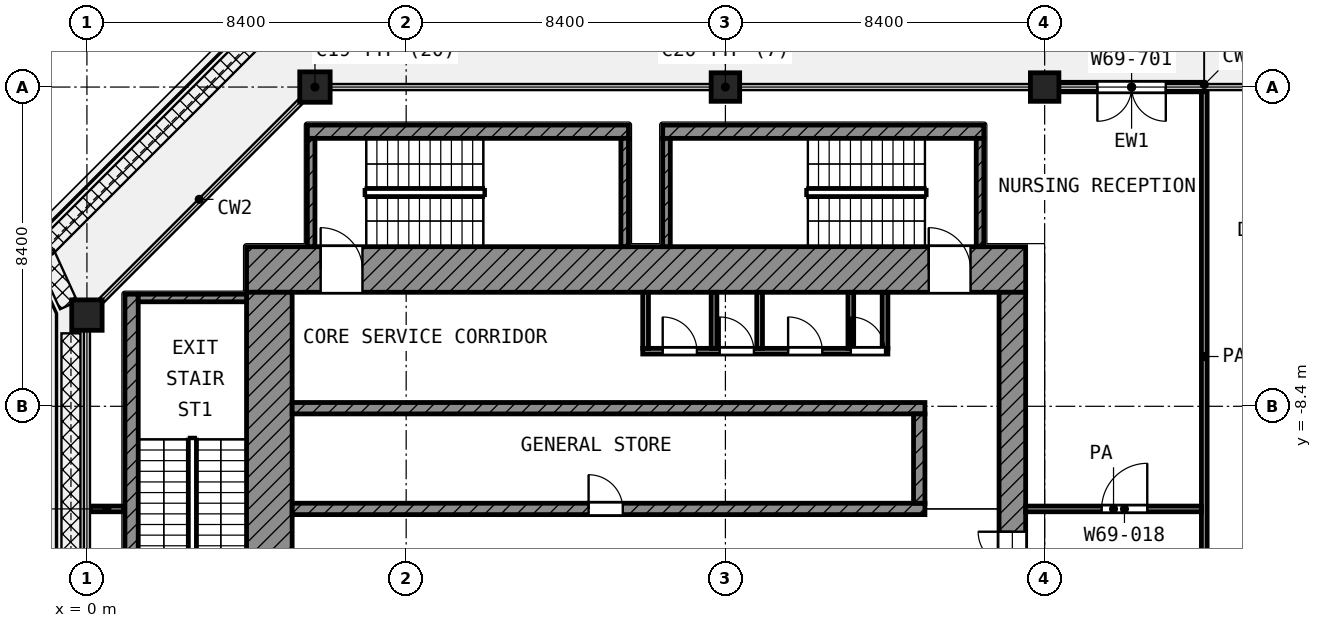
"""IFC4 building model, lengths in metres.
Left out: names, types, materials, properties, quantities, classifications, styles, units other than length and angle.
Written with IfcOpenShell. Run it as: python <this file> out.ifc"""

import sys

from ifc_helpers import new_model, si_unit, direction, frame, frame_2d, origin, origin_2d, place, context, subcontext, project, spatial, rectangle, extrude, element, fill, save


model = new_model("IFC4")
c1 = context("Model", 3, precision=1e-05, world=origin(), true_north=direction((0.0, 1.0)))
c2 = subcontext(c1, "Body", "Model", "MODEL_VIEW")
j1 = project(units=[si_unit("LENGTHUNIT", "METRE"), si_unit("PLANEANGLEUNIT", "RADIAN")], contexts=[c1])
p1 = place(None, origin())
s1 = spatial("IfcSite", under=j1, at=p1, CompositionType="ELEMENT")
p2 = place(p1, origin())
s2 = spatial("IfcBuilding", under=s1, at=p2, CompositionType="ELEMENT")
p3 = place(p2, frame((0.0, 0.0, 298.6)))
s3 = spatial("IfcBuildingStorey", under=s2, at=p3, CompositionType="ELEMENT", Elevation=298.6)
p4 = place(p3, frame((6.0, 0.0, 0.0), z_axis=(0.0, 0.0, 1.0), x_axis=(1.0, 0.0, 0.0)))
e1 = element("IfcColumn", 1, at=p4, inside=s3, PredefinedType="COLUMN", context=c2, shape_type="SweptSolid", body=[
    extrude(rectangle(XDim=0.8, YDim=0.8, at=origin_2d()), origin(), (0.0, 0.0, 1.0), 4.2),
])
for number, where, z_axis, x_axis in (
    (2, (16.8, 0.0, 0.0), (0.0, 0.0, 1.0), (1.0, 0.0, 0.0)),
    (3, (25.2, 0.0, 0.0), (0.0, 0.0, 1.0), (1.0, 0.0, 0.0)),
):
    element("IfcColumn", number, at=place(p3, frame(where, z_axis=z_axis, x_axis=x_axis)), inside=s3, PredefinedType="COLUMN", context=c2, shape_type="SweptSolid", body=[
        extrude(rectangle(XDim=0.75, YDim=0.75, at=origin_2d()), origin(), (0.0, 0.0, 1.0), 4.2),
    ])
p5 = place(p3, frame((0.0, -6.0, 0.0), z_axis=(0.0, 0.0, 1.0), x_axis=(1.0, 0.0, 0.0)))
e4 = element("IfcColumn", 4, at=p5, inside=s3, PredefinedType="COLUMN", context=c2, shape_type="SweptSolid", body=[
    extrude(rectangle(XDim=0.8, YDim=0.8, at=origin_2d()), origin(), (0.0, 0.0, 1.0), 4.2),
])
p6 = place(p3, frame((29.4, 0.0, 0.0), z_axis=(0.0, 0.0, 1.0), x_axis=(-1.0, 0.0, 0.0)))
e5 = element("IfcWall", 5, at=p6, inside=s3, PredefinedType="SOLIDWALL", context=c2, shape_type="SweptSolid", body=[
    extrude(rectangle(XDim=3.825, YDim=0.25, at=frame_2d((1.913, 0.0))), origin(), (0.0, 0.0, 1.0), 3.48),
])
p7 = place(p6, frame((1.012, 0.0, 0.0)))
e6 = element("IfcOpeningElement", 6, at=p7, cuts=e5, PredefinedType="OPENING", context=c2, shape_type="SweptSolid", body=[
    extrude(rectangle(XDim=1.8, YDim=2.1, at=frame_2d((0.9, 1.05))), frame((0.0, 0.135, 0.0), z_axis=(0.0, -1.0, 0.0), x_axis=(1.0, 0.0, 0.0)), (0.0, 0.0, 1.0), 0.27),
])
p8 = place(p3, frame((4.2, -4.8, 0.0), z_axis=(0.0, 0.0, 1.0), x_axis=(1.0, 0.0, 0.0)))
e7 = element("IfcWall", 7, at=p8, inside=s3, PredefinedType="SHEAR", context=c2, shape_type="SweptSolid", body=[
    extrude(rectangle(XDim=20.5, YDim=1.2, at=frame_2d((10.25, 0.0))), origin(), (0.0, 0.0, 1.0), 3.6),
])
p9 = place(p8, frame((1.95, 0.0, 0.0)))
e8 = element("IfcOpeningElement", 8, at=p9, cuts=e7, PredefinedType="OPENING", context=c2, shape_type="SweptSolid", body=[
    extrude(rectangle(XDim=1.1, YDim=2.1, at=frame_2d((0.55, 1.05))), frame((0.0, 0.61, 0.0), z_axis=(0.0, -1.0, 0.0), x_axis=(1.0, 0.0, 0.0)), (0.0, 0.0, 1.0), 1.22),
])
p10 = place(p8, frame((17.95, 0.0, 0.0)))
e9 = element("IfcOpeningElement", 9, at=p10, cuts=e7, PredefinedType="OPENING", context=c2, shape_type="SweptSolid", body=[
    extrude(rectangle(XDim=1.1, YDim=2.1, at=frame_2d((0.55, 1.05))), frame((0.0, 0.61, 0.0), z_axis=(0.0, -1.0, 0.0), x_axis=(1.0, 0.0, 0.0)), (0.0, 0.0, 1.0), 1.22),
])
p11 = place(p3, frame((4.8, -24.7, 0.0), z_axis=(0.0, 0.0, 1.0), x_axis=(0.0, 1.0, 0.0)))
e10 = element("IfcWall", 10, at=p11, inside=s3, PredefinedType="SHEAR", context=c2, shape_type="SweptSolid", body=[
    extrude(rectangle(XDim=19.3, YDim=1.2, at=frame_2d((9.65, 0.0))), origin(), (0.0, 0.0, 1.0), 3.6),
])
p12 = place(p11, frame((11.15, 0.0, 0.0)))
e11 = element("IfcOpeningElement", 11, at=p12, cuts=e10, PredefinedType="OPENING", context=c2, shape_type="SweptSolid", body=[
    extrude(rectangle(XDim=1.1, YDim=2.1, at=frame_2d((0.55, 1.05))), frame((0.0, 0.61, 0.0), z_axis=(0.0, -1.0, 0.0), x_axis=(1.0, 0.0, 0.0)), (0.0, 0.0, 1.0), 1.22),
])
p13 = place(p11, frame((1.85, 0.0, 0.0)))
e12 = element("IfcOpeningElement", 12, at=p13, cuts=e10, PredefinedType="OPENING", context=c2, shape_type="SweptSolid", body=[
    extrude(rectangle(XDim=1.1, YDim=2.1, at=frame_2d((0.55, 1.05))), frame((0.0, 0.61, 0.0), z_axis=(0.0, -1.0, 0.0), x_axis=(1.0, 0.0, 0.0)), (0.0, 0.0, 1.0), 1.22),
])
p14 = place(p3, frame((24.35, -24.0, 0.0), z_axis=(0.0, 0.0, 1.0), x_axis=(0.0, 1.0, 0.0)))
e13 = element("IfcWall", 13, at=p14, inside=s3, PredefinedType="SHEAR", context=c2, shape_type="SweptSolid", body=[
    extrude(rectangle(XDim=18.6, YDim=0.7, at=frame_2d((9.3, 0.0))), origin(), (0.0, 0.0, 1.0), 3.6),
])
p15 = place(p14, frame((10.5, 0.0, 0.0)))
e14 = element("IfcOpeningElement", 14, at=p15, cuts=e13, PredefinedType="OPENING", context=c2, shape_type="SweptSolid", body=[
    extrude(rectangle(XDim=1.8, YDim=2.1, at=frame_2d((0.9, 1.05))), frame((0.0, 0.36, 0.0), z_axis=(0.0, -1.0, 0.0), x_axis=(1.0, 0.0, 0.0)), (0.0, 0.0, 1.0), 0.72),
])
p16 = place(p3, frame((5.4, -8.45, 0.0), z_axis=(0.0, 0.0, 1.0), x_axis=(1.0, 0.0, 0.0)))
e15 = element("IfcWall", 15, at=p16, inside=s3, PredefinedType="SHEAR", context=c2, shape_type="SweptSolid", body=[
    extrude(rectangle(XDim=16.65, YDim=0.3, at=frame_2d((8.325, 0.0))), origin(), (0.0, 0.0, 1.0), 3.6),
])
p17 = place(p3, frame((5.4, -11.1, 0.0), z_axis=(0.0, 0.0, 1.0), x_axis=(1.0, 0.0, 0.0)))
e16 = element("IfcWall", 16, at=p17, inside=s3, PredefinedType="SHEAR", context=c2, shape_type="SweptSolid", body=[
    extrude(rectangle(XDim=16.65, YDim=0.3, at=frame_2d((8.325, 0.0))), origin(), (0.0, 0.0, 1.0), 3.6),
])
p18 = place(p17, frame((7.8, 0.0, 0.0)))
e17 = element("IfcOpeningElement", 17, at=p18, cuts=e16, PredefinedType="OPENING", context=c2, shape_type="SweptSolid", body=[
    extrude(rectangle(XDim=0.9, YDim=2.1, at=frame_2d((0.45, 1.05))), frame((0.0, 0.16, 0.0), z_axis=(0.0, -1.0, 0.0), x_axis=(1.0, 0.0, 0.0)), (0.0, 0.0, 1.0), 0.32),
])
p19 = place(p3, frame((21.9, -10.95, 0.0), z_axis=(0.0, 0.0, 1.0), x_axis=(0.0, 1.0, 0.0)))
e18 = element("IfcWall", 18, at=p19, inside=s3, PredefinedType="SHEAR", context=c2, shape_type="SweptSolid", body=[
    extrude(rectangle(XDim=2.35, YDim=0.3, at=frame_2d((1.175, 0.0))), origin(), (0.0, 0.0, 1.0), 3.6),
])
p20 = place(p3, frame((14.625, -6.95, 0.0), z_axis=(0.0, 0.0, 1.0), x_axis=(1.0, 0.0, 0.0)))
e19 = element("IfcWall", 19, at=p20, inside=s3, PredefinedType="PARTITIONING", context=c2, shape_type="SweptSolid", body=[
    extrude(rectangle(XDim=6.45, YDim=0.15, at=frame_2d((3.225, 0.0))), origin(), (0.0, 0.0, 1.0), 3.6),
])
p21 = place(p20, frame((0.525, 0.0, 0.0)))
e20 = element("IfcOpeningElement", 20, at=p21, cuts=e19, PredefinedType="OPENING", context=c2, shape_type="SweptSolid", body=[
    extrude(rectangle(XDim=0.9, YDim=2.1, at=frame_2d((0.45, 1.05))), frame((0.0, 0.085, 0.0), z_axis=(0.0, -1.0, 0.0), x_axis=(1.0, 0.0, 0.0)), (0.0, 0.0, 1.0), 0.17),
])
p22 = place(p20, frame((2.025, 0.0, 0.0)))
e21 = element("IfcOpeningElement", 21, at=p22, cuts=e19, PredefinedType="OPENING", context=c2, shape_type="SweptSolid", body=[
    extrude(rectangle(XDim=0.9, YDim=2.1, at=frame_2d((0.45, 1.05))), frame((0.0, 0.085, 0.0), z_axis=(0.0, -1.0, 0.0), x_axis=(1.0, 0.0, 0.0)), (0.0, 0.0, 1.0), 0.17),
])
p23 = place(p20, frame((3.825, 0.0, 0.0)))
e22 = element("IfcOpeningElement", 22, at=p23, cuts=e19, PredefinedType="OPENING", context=c2, shape_type="SweptSolid", body=[
    extrude(rectangle(XDim=0.9, YDim=2.1, at=frame_2d((0.45, 1.05))), frame((0.0, 0.085, 0.0), z_axis=(0.0, -1.0, 0.0), x_axis=(1.0, 0.0, 0.0)), (0.0, 0.0, 1.0), 0.17),
])
p24 = place(p20, frame((5.475, 0.0, 0.0)))
e23 = element("IfcOpeningElement", 23, at=p24, cuts=e19, PredefinedType="OPENING", context=c2, shape_type="SweptSolid", body=[
    extrude(rectangle(XDim=0.9, YDim=2.1, at=frame_2d((0.45, 1.05))), frame((0.0, 0.085, 0.0), z_axis=(0.0, -1.0, 0.0), x_axis=(1.0, 0.0, 0.0)), (0.0, 0.0, 1.0), 0.17),
])
for number, where, z_axis, x_axis in (
    (24, (14.7, -6.875, 0.0), (0.0, 0.0, 1.0), (0.0, 1.0, 0.0)),
    (25, (16.5, -6.875, 0.0), (0.0, 0.0, 1.0), (0.0, 1.0, 0.0)),
    (26, (17.7, -6.875, 0.0), (0.0, 0.0, 1.0), (0.0, 1.0, 0.0)),
    (27, (20.1, -6.875, 0.0), (0.0, 0.0, 1.0), (0.0, 1.0, 0.0)),
    (28, (21.0, -6.875, 0.0), (0.0, 0.0, 1.0), (0.0, 1.0, 0.0)),
):
    element("IfcWall", number, at=place(p3, frame(where, z_axis=z_axis, x_axis=x_axis)), inside=s3, PredefinedType="PARTITIONING", context=c2, shape_type="SweptSolid", body=[
        extrude(rectangle(XDim=1.475, YDim=0.15, at=frame_2d((0.738, 0.0))), origin(), (0.0, 0.0, 1.0), 3.6),
    ])
p25 = place(p3, frame((1.175, -13.9, 0.0), z_axis=(0.0, 0.0, 1.0), x_axis=(0.0, 1.0, 0.0)))
e29 = element("IfcWall", 29, at=p25, inside=s3, PredefinedType="SHEAR", context=c2, shape_type="SweptSolid", body=[
    extrude(rectangle(XDim=8.45, YDim=0.35, at=frame_2d((4.225, 0.0))), origin(), (0.0, 0.0, 1.0), 3.6),
])
p26 = place(p3, frame((1.35, -5.55, 0.0), z_axis=(0.0, 0.0, 1.0), x_axis=(1.0, 0.0, 0.0)))
e30 = element("IfcWall", 30, at=p26, inside=s3, PredefinedType="SHEAR", context=c2, shape_type="SweptSolid", body=[
    extrude(rectangle(XDim=2.85, YDim=0.2, at=frame_2d((1.425, 0.0))), origin(), (0.0, 0.0, 1.0), 3.6),
])
p27 = place(p3, frame((5.8, -1.175, 0.0), z_axis=(0.0, 0.0, 1.0), x_axis=(1.0, 0.0, 0.0)))
e31 = element("IfcWall", 31, at=p27, inside=s3, PredefinedType="SHEAR", context=c2, shape_type="SweptSolid", body=[
    extrude(rectangle(XDim=8.45, YDim=0.35, at=frame_2d((4.225, 0.0))), origin(), (0.0, 0.0, 1.0), 3.6),
])
for number, where, z_axis, x_axis in (
    (32, (5.9, -4.2, 0.0), (0.0, 0.0, 1.0), (0.0, 1.0, 0.0)),
    (33, (14.15, -4.2, 0.0), (0.0, 0.0, 1.0), (0.0, 1.0, 0.0)),
):
    element("IfcWall", number, at=place(p3, frame(where, z_axis=z_axis, x_axis=x_axis)), inside=s3, PredefinedType="SHEAR", context=c2, shape_type="SweptSolid", body=[
        extrude(rectangle(XDim=2.85, YDim=0.2, at=frame_2d((1.425, 0.0))), origin(), (0.0, 0.0, 1.0), 3.6),
    ])
p28 = place(p3, frame((15.15, -1.175, 0.0), z_axis=(0.0, 0.0, 1.0), x_axis=(1.0, 0.0, 0.0)))
e34 = element("IfcWall", 34, at=p28, inside=s3, PredefinedType="SHEAR", context=c2, shape_type="SweptSolid", body=[
    extrude(rectangle(XDim=8.45, YDim=0.35, at=frame_2d((4.225, 0.0))), origin(), (0.0, 0.0, 1.0), 3.6),
])
for number, where, z_axis, x_axis in (
    (35, (15.25, -4.2, 0.0), (0.0, 0.0, 1.0), (0.0, 1.0, 0.0)),
    (36, (23.5, -4.2, 0.0), (0.0, 0.0, 1.0), (0.0, 1.0, 0.0)),
):
    element("IfcWall", number, at=place(p3, frame(where, z_axis=z_axis, x_axis=x_axis)), inside=s3, PredefinedType="SHEAR", context=c2, shape_type="SweptSolid", body=[
        extrude(rectangle(XDim=2.85, YDim=0.2, at=frame_2d((1.425, 0.0))), origin(), (0.0, 0.0, 1.0), 3.6),
    ])
p29 = place(p3, frame((0.08, -11.1, 0.0), z_axis=(0.0, 0.0, 1.0), x_axis=(1.0, 0.0, 0.0)))
e37 = element("IfcWall", 37, at=p29, inside=s3, PredefinedType="PARTITIONING", context=c2, shape_type="SweptSolid", body=[
    extrude(rectangle(XDim=0.89, YDim=0.15, at=frame_2d((0.445, 0.0))), origin(), (0.0, 0.0, 1.0), 2.7),
])
p30 = place(p3, frame((24.7, -11.1, 0.0), z_axis=(0.0, 0.0, 1.0), x_axis=(1.0, 0.0, 0.0)))
e38 = element("IfcWall", 38, at=p30, inside=s3, PredefinedType="PARTITIONING", context=c2, shape_type="SweptSolid", body=[
    extrude(rectangle(XDim=4.625, YDim=0.15, at=frame_2d((2.312, 0.0))), origin(), (0.0, 0.0, 1.0), 3.6),
])
p31 = place(p30, frame((2.0, 0.0, 0.0)))
e39 = element("IfcOpeningElement", 39, at=p31, cuts=e38, PredefinedType="OPENING", context=c2, shape_type="SweptSolid", body=[
    extrude(rectangle(XDim=1.2, YDim=2.1, at=frame_2d((0.6, 1.05))), frame((0.0, 0.085, 0.0), z_axis=(0.0, -1.0, 0.0), x_axis=(1.0, 0.0, 0.0)), (0.0, 0.0, 1.0), 0.17),
])
p32 = place(p3, frame((29.4, -14.1, 0.0), z_axis=(0.0, 0.0, 1.0), x_axis=(0.0, 1.0, 0.0)))
e40 = element("IfcWall", 40, at=p32, inside=s3, PredefinedType="PARTITIONING", context=c2, shape_type="SweptSolid", body=[
    extrude(rectangle(XDim=14.02, YDim=0.15, at=frame_2d((7.01, 0.0))), origin(), (0.0, 0.0, 1.0), 3.6),
])
p33 = place(p7, origin())
e41 = element("IfcDoor", 41, at=p33, inside=s3, OperationType="DOUBLE_DOOR_SINGLE_SWING", PredefinedType="DOOR", context=c2, shape_type="SweptSolid", body=[
    extrude(rectangle(XDim=1.8, YDim=2.1, at=frame_2d((0.9, 1.05))), frame((0.0, 0.025, 0.0), z_axis=(0.0, -1.0, 0.0), x_axis=(1.0, 0.0, 0.0)), (0.0, 0.0, 1.0), 0.05),
])
fill(e6, e41)
p34 = place(p9, origin())
e42 = element("IfcDoor", 42, at=p34, inside=s3, OperationType="SINGLE_SWING_LEFT", PredefinedType="DOOR", context=c2, shape_type="SweptSolid", body=[
    extrude(rectangle(XDim=1.1, YDim=2.1, at=frame_2d((0.55, 1.05))), frame((0.0, 0.025, 0.0), z_axis=(0.0, -1.0, 0.0), x_axis=(1.0, 0.0, 0.0)), (0.0, 0.0, 1.0), 0.05),
])
fill(e8, e42)
p35 = place(p10, origin())
e43 = element("IfcDoor", 43, at=p35, inside=s3, OperationType="SINGLE_SWING_LEFT", PredefinedType="DOOR", context=c2, shape_type="SweptSolid", body=[
    extrude(rectangle(XDim=1.1, YDim=2.1, at=frame_2d((0.55, 1.05))), frame((0.0, 0.025, 0.0), z_axis=(0.0, -1.0, 0.0), x_axis=(1.0, 0.0, 0.0)), (0.0, 0.0, 1.0), 0.05),
])
fill(e9, e43)
p36 = place(p15, origin())
e44 = element("IfcDoor", 44, at=p36, inside=s3, OperationType="DOUBLE_DOOR_SINGLE_SWING", PredefinedType="DOOR", context=c2, shape_type="SweptSolid", body=[
    extrude(rectangle(XDim=1.8, YDim=2.1, at=frame_2d((0.9, 1.05))), frame((0.0, 0.025, 0.0), z_axis=(0.0, -1.0, 0.0), x_axis=(1.0, 0.0, 0.0)), (0.0, 0.0, 1.0), 0.05),
])
fill(e14, e44)
p37 = place(p21, origin())
e45 = element("IfcDoor", 45, at=p37, inside=s3, OperationType="SINGLE_SWING_LEFT", PredefinedType="DOOR", context=c2, shape_type="SweptSolid", body=[
    extrude(rectangle(XDim=0.9, YDim=2.1, at=frame_2d((0.45, 1.05))), frame((0.0, 0.025, 0.0), z_axis=(0.0, -1.0, 0.0), x_axis=(1.0, 0.0, 0.0)), (0.0, 0.0, 1.0), 0.05),
])
fill(e20, e45)
p38 = place(p22, origin())
e46 = element("IfcDoor", 46, at=p38, inside=s3, OperationType="SINGLE_SWING_LEFT", PredefinedType="DOOR", context=c2, shape_type="SweptSolid", body=[
    extrude(rectangle(XDim=0.9, YDim=2.1, at=frame_2d((0.45, 1.05))), frame((0.0, 0.025, 0.0), z_axis=(0.0, -1.0, 0.0), x_axis=(1.0, 0.0, 0.0)), (0.0, 0.0, 1.0), 0.05),
])
fill(e21, e46)
p39 = place(p23, origin())
e47 = element("IfcDoor", 47, at=p39, inside=s3, OperationType="SINGLE_SWING_LEFT", PredefinedType="DOOR", context=c2, shape_type="SweptSolid", body=[
    extrude(rectangle(XDim=0.9, YDim=2.1, at=frame_2d((0.45, 1.05))), frame((0.0, 0.025, 0.0), z_axis=(0.0, -1.0, 0.0), x_axis=(1.0, 0.0, 0.0)), (0.0, 0.0, 1.0), 0.05),
])
fill(e22, e47)
p40 = place(p24, origin())
e48 = element("IfcDoor", 48, at=p40, inside=s3, OperationType="SINGLE_SWING_LEFT", PredefinedType="DOOR", context=c2, shape_type="SweptSolid", body=[
    extrude(rectangle(XDim=0.9, YDim=2.1, at=frame_2d((0.45, 1.05))), frame((0.0, 0.025, 0.0), z_axis=(0.0, -1.0, 0.0), x_axis=(1.0, 0.0, 0.0)), (0.0, 0.0, 1.0), 0.05),
])
fill(e23, e48)
p41 = place(p18, origin())
e49 = element("IfcDoor", 49, at=p41, inside=s3, OperationType="SINGLE_SWING_LEFT", PredefinedType="DOOR", context=c2, shape_type="SweptSolid", body=[
    extrude(rectangle(XDim=0.9, YDim=2.1, at=frame_2d((0.45, 1.05))), frame((0.0, 0.025, 0.0), z_axis=(0.0, -1.0, 0.0), x_axis=(1.0, 0.0, 0.0)), (0.0, 0.0, 1.0), 0.05),
])
fill(e17, e49)
p42 = place(p31, origin())
e50 = element("IfcDoor", 50, at=p42, inside=s3, OperationType="SINGLE_SWING_RIGHT", PredefinedType="DOOR", context=c2, shape_type="SweptSolid", body=[
    extrude(rectangle(XDim=1.2, YDim=2.1, at=frame_2d((0.6, 1.05))), frame((0.0, 0.025, 0.0), z_axis=(0.0, -1.0, 0.0), x_axis=(1.0, 0.0, 0.0)), (0.0, 0.0, 1.0), 0.05),
])
fill(e39, e50)
save(model, sys.argv[1])
